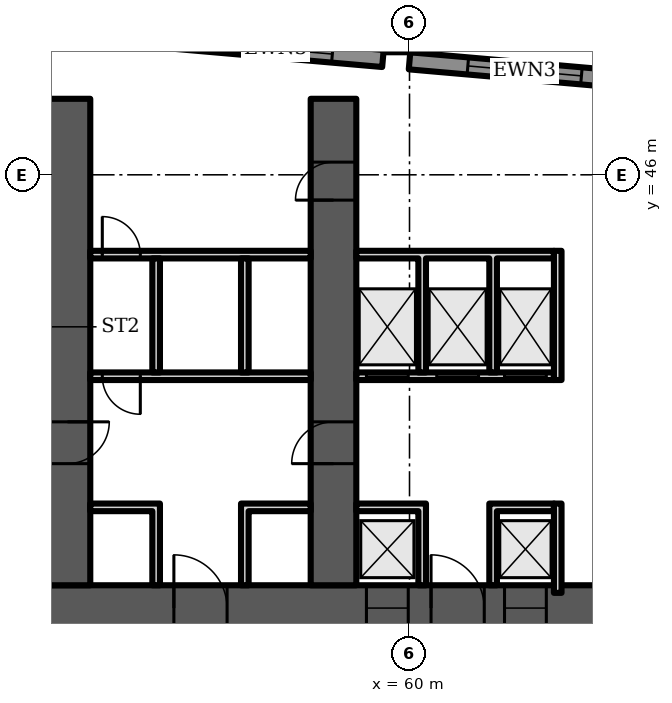
"""IFC4 building model, lengths in metres.
Left out: names, types, materials, properties, quantities, classifications, styles, units other than length and angle.
Written with IfcOpenShell. Run it as: python <this file> out.ifc"""

import sys

from ifc_helpers import new_model, si_unit, direction, frame, frame_2d, origin, origin_2d, place, context, subcontext, project, spatial, polyline, rectangle, outline, extrude, element, fill, save


model = new_model("IFC4")
c1 = context("Model", 3, precision=1e-05, world=origin(), true_north=direction((0.0, 1.0)))
c2 = subcontext(c1, "Body", "Model", "MODEL_VIEW")
j1 = project(units=[si_unit("LENGTHUNIT", "METRE"), si_unit("PLANEANGLEUNIT", "RADIAN")], contexts=[c1])
p1 = place(None, origin())
s1 = spatial("IfcSite", under=j1, at=p1, CompositionType="ELEMENT")
p2 = place(p1, origin())
s2 = spatial("IfcBuilding", under=s1, at=p2, CompositionType="ELEMENT")
p3 = place(p2, frame((0.0, 0.0, 21.5)))
s3 = spatial("IfcBuildingStorey", under=s2, at=p3, CompositionType="ELEMENT", Elevation=21.5)
p4 = place(p3, frame((60.0, 49.885, 0.0), z_axis=(0.0, 0.0, 1.0), x_axis=(1.0, 0.0, 0.0)))
e1 = element("IfcColumn", 1, at=p4, inside=s3, PredefinedType="COLUMN", context=c2, shape_type="SweptSolid", body=[
    extrude(rectangle(XDim=1.32, YDim=1.32, at=origin_2d()), origin(), (0.0, 0.0, 1.0), 6.0),
])
p5 = place(p3, frame((66.058, 48.469, 0.0), z_axis=(0.0, 0.0, 1.0), x_axis=(-0.996195, 0.087158, 0.0)))
e2 = element("IfcWall", 2, at=p5, inside=s3, PredefinedType="SOLIDWALL", context=c2, shape_type="SweptSolid", body=[
    extrude(rectangle(XDim=6.081, YDim=0.45, at=frame_2d((3.041, 0.0))), origin(), (0.0, 0.0, 1.0), 5.7),
])
p6 = place(p5, frame((1.541, 0.0, 1.0)))
e3 = element("IfcOpeningElement", 3, at=p6, cuts=e2, PredefinedType="OPENING", context=c2, shape_type="SweptSolid", body=[
    extrude(rectangle(XDim=3.0, YDim=3.7, at=frame_2d((1.5, 1.85))), frame((0.0, 0.235, 0.0), z_axis=(0.0, -1.0, 0.0), x_axis=(1.0, 0.0, 0.0)), (0.0, 0.0, 1.0), 0.47),
])
p7 = place(p3, frame((59.301, 49.06, 0.0), z_axis=(0.0, 0.0, 1.0), x_axis=(-0.996195, 0.087145, 0.0)))
e4 = element("IfcWall", 4, at=p7, inside=s3, PredefinedType="SOLIDWALL", context=c2, shape_type="SweptSolid", body=[
    extrude(rectangle(XDim=11.344, YDim=0.45, at=frame_2d((5.672, 0.0))), origin(), (0.0, 0.0, 1.0), 5.7),
])
p8 = place(p7, frame((1.336, 0.0, 1.0)))
e5 = element("IfcOpeningElement", 5, at=p8, cuts=e4, PredefinedType="OPENING", context=c2, shape_type="SweptSolid", body=[
    extrude(rectangle(XDim=3.0, YDim=3.7, at=frame_2d((1.5, 1.85))), frame((0.0, 0.235, 0.0), z_axis=(0.0, -1.0, 0.0), x_axis=(1.0, 0.0, 0.0)), (0.0, 0.0, 1.0), 0.47),
])
p9 = place(p7, frame((7.008, 0.0, 1.0)))
e6 = element("IfcOpeningElement", 6, at=p9, cuts=e4, PredefinedType="OPENING", context=c2, shape_type="SweptSolid", body=[
    extrude(rectangle(XDim=3.0, YDim=3.7, at=frame_2d((1.5, 1.85))), frame((0.0, 0.235, 0.0), z_axis=(0.0, -1.0, 0.0), x_axis=(1.0, 0.0, 0.0)), (0.0, 0.0, 1.0), 0.47),
])
p10 = place(p3, frame((9.0, 34.6, 0.0), z_axis=(0.0, 0.0, 1.0), x_axis=(1.0, 0.0, 0.0)))
e7 = element("IfcWall", 7, at=p10, inside=s3, PredefinedType="SHEAR", context=c2, shape_type="SweptSolid", body=[
    extrude(rectangle(XDim=56.0, YDim=1.2, at=frame_2d((28.0, 0.0))), origin(), (0.0, 0.0, 1.0), 5.7),
])
p11 = place(p10, frame((2.0, 0.0, 0.0)))
e8 = element("IfcOpeningElement", 8, at=p11, cuts=e7, PredefinedType="OPENING", context=c2, shape_type="SweptSolid", body=[
    extrude(rectangle(XDim=1.0, YDim=2.1, at=frame_2d((0.5, 1.05))), frame((0.0, 0.61, 0.0), z_axis=(0.0, -1.0, 0.0), x_axis=(1.0, 0.0, 0.0)), (0.0, 0.0, 1.0), 1.22),
])
p12 = place(p10, frame((4.6, 0.0, 0.0)))
e9 = element("IfcOpeningElement", 9, at=p12, cuts=e7, PredefinedType="OPENING", context=c2, shape_type="SweptSolid", body=[
    extrude(rectangle(XDim=1.0, YDim=2.1, at=frame_2d((0.5, 1.05))), frame((0.0, 0.61, 0.0), z_axis=(0.0, -1.0, 0.0), x_axis=(1.0, 0.0, 0.0)), (0.0, 0.0, 1.0), 1.22),
])
p13 = place(p10, frame((7.867, 0.0, 0.0)))
e10 = element("IfcOpeningElement", 10, at=p13, cuts=e7, PredefinedType="OPENING", context=c2, shape_type="SweptSolid", body=[
    extrude(rectangle(XDim=1.1, YDim=2.1, at=frame_2d((0.55, 1.05))), frame((0.0, 0.61, 0.0), z_axis=(0.0, -1.0, 0.0), x_axis=(1.0, 0.0, 0.0)), (0.0, 0.0, 1.0), 1.22),
])
p14 = place(p10, frame((12.033, 0.0, 0.0)))
e11 = element("IfcOpeningElement", 11, at=p14, cuts=e7, PredefinedType="OPENING", context=c2, shape_type="SweptSolid", body=[
    extrude(rectangle(XDim=1.1, YDim=2.1, at=frame_2d((0.55, 1.05))), frame((0.0, 0.61, 0.0), z_axis=(0.0, -1.0, 0.0), x_axis=(1.0, 0.0, 0.0)), (0.0, 0.0, 1.0), 1.22),
])
p15 = place(p10, frame((9.8, 0.0, 0.0)))
e12 = element("IfcOpeningElement", 12, at=p15, cuts=e7, PredefinedType="OPENING", context=c2, shape_type="SweptSolid", body=[
    extrude(rectangle(XDim=1.4, YDim=2.1, at=frame_2d((0.7, 1.05))), frame((0.0, 0.61, 0.0), z_axis=(0.0, -1.0, 0.0), x_axis=(1.0, 0.0, 0.0)), (0.0, 0.0, 1.0), 1.22),
])
p16 = place(p10, frame((14.65, 0.0, 0.0)))
e13 = element("IfcOpeningElement", 13, at=p16, cuts=e7, PredefinedType="OPENING", context=c2, shape_type="SweptSolid", body=[
    extrude(rectangle(XDim=1.2, YDim=2.1, at=frame_2d((0.6, 1.05))), frame((0.0, 0.61, 0.0), z_axis=(0.0, -1.0, 0.0), x_axis=(1.0, 0.0, 0.0)), (0.0, 0.0, 1.0), 1.22),
])
p17 = place(p10, frame((21.867, 0.0, 0.0)))
e14 = element("IfcOpeningElement", 14, at=p17, cuts=e7, PredefinedType="OPENING", context=c2, shape_type="SweptSolid", body=[
    extrude(rectangle(XDim=1.1, YDim=2.1, at=frame_2d((0.55, 1.05))), frame((0.0, 0.61, 0.0), z_axis=(0.0, -1.0, 0.0), x_axis=(1.0, 0.0, 0.0)), (0.0, 0.0, 1.0), 1.22),
])
p18 = place(p10, frame((26.033, 0.0, 0.0)))
e15 = element("IfcOpeningElement", 15, at=p18, cuts=e7, PredefinedType="OPENING", context=c2, shape_type="SweptSolid", body=[
    extrude(rectangle(XDim=1.1, YDim=2.1, at=frame_2d((0.55, 1.05))), frame((0.0, 0.61, 0.0), z_axis=(0.0, -1.0, 0.0), x_axis=(1.0, 0.0, 0.0)), (0.0, 0.0, 1.0), 1.22),
])
p19 = place(p10, frame((23.8, 0.0, 0.0)))
e16 = element("IfcOpeningElement", 16, at=p19, cuts=e7, PredefinedType="OPENING", context=c2, shape_type="SweptSolid", body=[
    extrude(rectangle(XDim=1.4, YDim=2.1, at=frame_2d((0.7, 1.05))), frame((0.0, 0.61, 0.0), z_axis=(0.0, -1.0, 0.0), x_axis=(1.0, 0.0, 0.0)), (0.0, 0.0, 1.0), 1.22),
])
p20 = place(p10, frame((28.867, 0.0, 0.0)))
e17 = element("IfcOpeningElement", 17, at=p20, cuts=e7, PredefinedType="OPENING", context=c2, shape_type="SweptSolid", body=[
    extrude(rectangle(XDim=1.1, YDim=2.1, at=frame_2d((0.55, 1.05))), frame((0.0, 0.61, 0.0), z_axis=(0.0, -1.0, 0.0), x_axis=(1.0, 0.0, 0.0)), (0.0, 0.0, 1.0), 1.22),
])
p21 = place(p10, frame((33.033, 0.0, 0.0)))
e18 = element("IfcOpeningElement", 18, at=p21, cuts=e7, PredefinedType="OPENING", context=c2, shape_type="SweptSolid", body=[
    extrude(rectangle(XDim=1.1, YDim=2.1, at=frame_2d((0.55, 1.05))), frame((0.0, 0.61, 0.0), z_axis=(0.0, -1.0, 0.0), x_axis=(1.0, 0.0, 0.0)), (0.0, 0.0, 1.0), 1.22),
])
p22 = place(p10, frame((40.15, 0.0, 0.0)))
e19 = element("IfcOpeningElement", 19, at=p22, cuts=e7, PredefinedType="OPENING", context=c2, shape_type="SweptSolid", body=[
    extrude(rectangle(XDim=1.2, YDim=2.1, at=frame_2d((0.6, 1.05))), frame((0.0, 0.61, 0.0), z_axis=(0.0, -1.0, 0.0), x_axis=(1.0, 0.0, 0.0)), (0.0, 0.0, 1.0), 1.22),
])
p23 = place(p10, frame((44.8, 0.0, 0.0)))
e20 = element("IfcOpeningElement", 20, at=p23, cuts=e7, PredefinedType="OPENING", context=c2, shape_type="SweptSolid", body=[
    extrude(rectangle(XDim=1.4, YDim=2.1, at=frame_2d((0.7, 1.05))), frame((0.0, 0.61, 0.0), z_axis=(0.0, -1.0, 0.0), x_axis=(1.0, 0.0, 0.0)), (0.0, 0.0, 1.0), 1.22),
])
p24 = place(p10, frame((49.867, 0.0, 0.0)))
e21 = element("IfcOpeningElement", 21, at=p24, cuts=e7, PredefinedType="OPENING", context=c2, shape_type="SweptSolid", body=[
    extrude(rectangle(XDim=1.1, YDim=2.1, at=frame_2d((0.55, 1.05))), frame((0.0, 0.61, 0.0), z_axis=(0.0, -1.0, 0.0), x_axis=(1.0, 0.0, 0.0)), (0.0, 0.0, 1.0), 1.22),
])
p25 = place(p10, frame((53.5, 0.0, 0.0)))
e22 = element("IfcOpeningElement", 22, at=p25, cuts=e7, PredefinedType="OPENING", context=c2, shape_type="SweptSolid", body=[
    extrude(rectangle(XDim=1.1, YDim=2.1, at=frame_2d((0.55, 1.05))), frame((0.0, 0.61, 0.0), z_axis=(0.0, -1.0, 0.0), x_axis=(1.0, 0.0, 0.0)), (0.0, 0.0, 1.0), 1.22),
])
p26 = place(p10, frame((51.567, 0.0, 0.0)))
e23 = element("IfcOpeningElement", 23, at=p26, cuts=e7, PredefinedType="OPENING", context=c2, shape_type="SweptSolid", body=[
    extrude(rectangle(XDim=1.4, YDim=2.1, at=frame_2d((0.7, 1.05))), frame((0.0, 0.61, 0.0), z_axis=(0.0, -1.0, 0.0), x_axis=(1.0, 0.0, 0.0)), (0.0, 0.0, 1.0), 1.22),
])
p27 = place(p3, frame((51.0, 35.2, 0.0), z_axis=(0.0, 0.0, 1.0), x_axis=(0.0, 1.0, 0.0)))
e24 = element("IfcWall", 24, at=p27, inside=s3, PredefinedType="SHEAR", context=c2, shape_type="SweptSolid", body=[
    extrude(rectangle(XDim=12.8, YDim=1.2, at=frame_2d((6.4, 0.0))), origin(), (0.0, 0.0, 1.0), 5.7),
])
p28 = place(p27, frame((3.2, 0.0, 0.0)))
e25 = element("IfcOpeningElement", 25, at=p28, cuts=e24, PredefinedType="OPENING", context=c2, shape_type="SweptSolid", body=[
    extrude(rectangle(XDim=1.1, YDim=2.1, at=frame_2d((0.55, 1.05))), frame((0.0, 0.61, 0.0), z_axis=(0.0, -1.0, 0.0), x_axis=(1.0, 0.0, 0.0)), (0.0, 0.0, 1.0), 1.22),
])
p29 = place(p3, frame((58.0, 35.2, 0.0), z_axis=(0.0, 0.0, 1.0), x_axis=(0.0, 1.0, 0.0)))
e26 = element("IfcWall", 26, at=p29, inside=s3, PredefinedType="SHEAR", context=c2, shape_type="SweptSolid", body=[
    extrude(rectangle(XDim=12.8, YDim=1.2, at=frame_2d((6.4, 0.0))), origin(), (0.0, 0.0, 1.0), 5.7),
])
p30 = place(p29, frame((10.134, 0.0, 0.0)))
e27 = element("IfcOpeningElement", 27, at=p30, cuts=e26, PredefinedType="OPENING", context=c2, shape_type="SweptSolid", body=[
    extrude(rectangle(XDim=1.0, YDim=2.1, at=frame_2d((0.5, 1.05))), frame((0.0, 0.61, 0.0), z_axis=(0.0, -1.0, 0.0), x_axis=(1.0, 0.0, 0.0)), (0.0, 0.0, 1.0), 1.22),
])
p31 = place(p29, frame((3.2, 0.0, 0.0)))
e28 = element("IfcOpeningElement", 28, at=p31, cuts=e26, PredefinedType="OPENING", context=c2, shape_type="SweptSolid", body=[
    extrude(rectangle(XDim=1.1, YDim=2.1, at=frame_2d((0.55, 1.05))), frame((0.0, 0.61, 0.0), z_axis=(0.0, -1.0, 0.0), x_axis=(1.0, 0.0, 0.0)), (0.0, 0.0, 1.0), 1.22),
])
p32 = place(p3, frame((51.6, 40.7, 0.0), z_axis=(0.0, 0.0, 1.0), x_axis=(1.0, 0.0, 0.0)))
e29 = element("IfcWall", 29, at=p32, inside=s3, PredefinedType="PARTITIONING", context=c2, shape_type="SweptSolid", body=[
    extrude(rectangle(XDim=5.8, YDim=0.2, at=frame_2d((2.9, 0.0))), origin(), (0.0, 0.0, 1.0), 5.7),
])
p33 = place(p32, frame((0.317, 0.0, 0.0)))
e30 = element("IfcOpeningElement", 30, at=p33, cuts=e29, PredefinedType="OPENING", context=c2, shape_type="SweptSolid", body=[
    extrude(rectangle(XDim=1.0, YDim=2.1, at=frame_2d((0.5, 1.05))), frame((0.0, 0.11, 0.0), z_axis=(0.0, -1.0, 0.0), x_axis=(1.0, 0.0, 0.0)), (0.0, 0.0, 1.0), 0.22),
])
p34 = place(p3, frame((51.6, 43.9, 0.0), z_axis=(0.0, 0.0, 1.0), x_axis=(1.0, 0.0, 0.0)))
e31 = element("IfcWall", 31, at=p34, inside=s3, PredefinedType="PARTITIONING", context=c2, shape_type="SweptSolid", body=[
    extrude(rectangle(XDim=5.8, YDim=0.2, at=frame_2d((2.9, 0.0))), origin(), (0.0, 0.0, 1.0), 5.7),
])
p35 = place(p34, frame((0.317, 0.0, 0.0)))
e32 = element("IfcOpeningElement", 32, at=p35, cuts=e31, PredefinedType="OPENING", context=c2, shape_type="SweptSolid", body=[
    extrude(rectangle(XDim=1.0, YDim=2.1, at=frame_2d((0.5, 1.05))), frame((0.0, 0.11, 0.0), z_axis=(0.0, -1.0, 0.0), x_axis=(1.0, 0.0, 0.0)), (0.0, 0.0, 1.0), 0.22),
])
p36 = place(p3, frame((0.0, 0.0, -0.0)))
e33 = element("IfcWall", 33, at=p36, inside=s3, PredefinedType="PARTITIONING", context=c2, shape_type="SweptSolid", body=[
    extrude(outline(polyline([(53.233, 37.15), (51.6, 37.15), (51.6, 37.35), (53.233, 37.35), (53.433, 37.35), (53.433, 35.2), (53.233, 35.2), (53.233, 37.15)])), origin(), (0.0, 0.0, 1.0), 5.7),
])
p37 = place(p3, frame((0.0, 0.0, -0.0)))
e34 = element("IfcWall", 34, at=p37, inside=s3, PredefinedType="PARTITIONING", context=c2, shape_type="SweptSolid", body=[
    extrude(outline(polyline([(55.567, 37.35), (55.767, 37.35), (57.4, 37.35), (57.4, 37.15), (55.767, 37.15), (55.767, 35.2), (55.567, 35.2), (55.567, 37.35)])), origin(), (0.0, 0.0, 1.0), 5.7),
])
p38 = place(p3, frame((0.0, 0.0, -0.0)))
e35 = element("IfcWall", 35, at=p38, inside=s3, PredefinedType="PARTITIONING", context=c2, shape_type="SweptSolid", body=[
    extrude(outline(polyline([(53.233, 40.8), (53.233, 43.8), (53.433, 43.8), (53.433, 40.8), (53.233, 40.8)])), origin(), (0.0, 0.0, 1.0), 5.7),
])
p39 = place(p3, frame((0.0, 0.0, -0.0)))
e36 = element("IfcWall", 36, at=p39, inside=s3, PredefinedType="PARTITIONING", context=c2, shape_type="SweptSolid", body=[
    extrude(outline(polyline([(55.567, 40.8), (55.567, 43.8), (55.767, 43.8), (55.767, 40.8), (55.567, 40.8)])), origin(), (0.0, 0.0, 1.0), 5.7),
])
p40 = place(p3, frame((58.6, 40.7, 0.0), z_axis=(0.0, 0.0, 1.0), x_axis=(1.0, 0.0, 0.0)))
e37 = element("IfcWall", 37, at=p40, inside=s3, PredefinedType="PARTITIONING", context=c2, shape_type="SweptSolid", body=[
    extrude(rectangle(XDim=5.2, YDim=0.2, at=frame_2d((2.6, 0.0))), origin(), (0.0, 0.0, 1.0), 5.7),
])
p41 = place(p40, frame((0.267, 0.0, 0.0)))
e38 = element("IfcOpeningElement", 38, at=p41, cuts=e37, PredefinedType="OPENING", context=c2, shape_type="SweptSolid", body=[
    extrude(rectangle(XDim=1.1, YDim=2.1, at=frame_2d((0.55, 1.05))), frame((0.0, 0.11, 0.0), z_axis=(0.0, -1.0, 0.0), x_axis=(1.0, 0.0, 0.0)), (0.0, 0.0, 1.0), 0.22),
])
p42 = place(p40, frame((2.117, 0.0, 0.0)))
e39 = element("IfcOpeningElement", 39, at=p42, cuts=e37, PredefinedType="OPENING", context=c2, shape_type="SweptSolid", body=[
    extrude(rectangle(XDim=1.1, YDim=2.1, at=frame_2d((0.55, 1.05))), frame((0.0, 0.11, 0.0), z_axis=(0.0, -1.0, 0.0), x_axis=(1.0, 0.0, 0.0)), (0.0, 0.0, 1.0), 0.22),
])
p43 = place(p40, frame((3.9, 0.0, 0.0)))
e40 = element("IfcOpeningElement", 40, at=p43, cuts=e37, PredefinedType="OPENING", context=c2, shape_type="SweptSolid", body=[
    extrude(rectangle(XDim=1.1, YDim=2.1, at=frame_2d((0.55, 1.05))), frame((0.0, 0.11, 0.0), z_axis=(0.0, -1.0, 0.0), x_axis=(1.0, 0.0, 0.0)), (0.0, 0.0, 1.0), 0.22),
])
p44 = place(p3, frame((0.0, 0.0, -0.0)))
e41 = element("IfcWall", 41, at=p44, inside=s3, PredefinedType="PARTITIONING", context=c2, shape_type="SweptSolid", body=[
    extrude(outline(polyline([(60.233, 37.15), (58.6, 37.15), (58.6, 37.35), (60.233, 37.35), (60.433, 37.35), (60.433, 35.2), (60.233, 35.2), (60.233, 37.15)])), origin(), (0.0, 0.0, 1.0), 5.7),
])
p45 = place(p3, frame((0.0, 0.0, -0.0)))
e42 = element("IfcWall", 42, at=p45, inside=s3, PredefinedType="PARTITIONING", context=c2, shape_type="SweptSolid", body=[
    extrude(outline(polyline([(62.1, 37.35), (62.3, 37.35), (63.8, 37.35), (63.8, 37.15), (62.3, 37.15), (62.3, 35.2), (62.1, 35.2), (62.1, 37.35)])), origin(), (0.0, 0.0, 1.0), 5.7),
])
p46 = place(p3, frame((0.0, 0.0, -0.0)))
e43 = element("IfcWall", 43, at=p46, inside=s3, PredefinedType="PARTITIONING", context=c2, shape_type="SweptSolid", body=[
    extrude(outline(polyline([(60.433, 40.8), (60.233, 40.8), (60.233, 43.8), (58.6, 43.8), (58.6, 44.0), (63.8, 44.0), (63.8, 43.8), (62.3, 43.8), (62.3, 40.8), (62.1, 40.8), (62.1, 43.8), (60.433, 43.8), (60.433, 40.8)])), origin(), (0.0, 0.0, 1.0), 5.7),
])
p47 = place(p3, frame((63.9, 35.0, 0.0), z_axis=(0.0, 0.0, 1.0), x_axis=(0.0, 1.0, 0.0)))
e44 = element("IfcWall", 44, at=p47, inside=s3, PredefinedType="PARTITIONING", context=c2, shape_type="SweptSolid", body=[
    extrude(rectangle(XDim=2.35, YDim=0.2, at=frame_2d((1.175, 0.0))), origin(), (0.0, 0.0, 1.0), 5.7),
])
p48 = place(p3, frame((63.9, 40.6, 0.0), z_axis=(0.0, 0.0, 1.0), x_axis=(0.0, 1.0, 0.0)))
e45 = element("IfcWall", 45, at=p48, inside=s3, PredefinedType="PARTITIONING", context=c2, shape_type="SweptSolid", body=[
    extrude(rectangle(XDim=3.4, YDim=0.2, at=frame_2d((1.7, 0.0))), origin(), (0.0, 0.0, 1.0), 5.7),
])
p49 = place(p6, origin())
e46 = element("IfcWindow", 46, at=p49, inside=s3, PartitioningType="SINGLE_PANEL", PredefinedType="WINDOW", context=c2, shape_type="SweptSolid", body=[
    extrude(rectangle(XDim=3.0, YDim=3.7, at=frame_2d((1.5, 1.85))), frame((0.0, 0.105, 0.0), z_axis=(0.0, -1.0, 0.0), x_axis=(1.0, 0.0, 0.0)), (0.0, 0.0, 1.0), 0.06),
])
fill(e3, e46)
p50 = place(p8, origin())
e47 = element("IfcWindow", 47, at=p50, inside=s3, PartitioningType="SINGLE_PANEL", PredefinedType="WINDOW", context=c2, shape_type="SweptSolid", body=[
    extrude(rectangle(XDim=3.0, YDim=3.7, at=frame_2d((1.5, 1.85))), frame((0.0, 0.105, 0.0), z_axis=(0.0, -1.0, 0.0), x_axis=(1.0, 0.0, 0.0)), (0.0, 0.0, 1.0), 0.06),
])
fill(e5, e47)
p51 = place(p23, origin())
e48 = element("IfcDoor", 48, at=p51, inside=s3, OperationType="DOUBLE_DOOR_SINGLE_SWING", PredefinedType="DOOR", context=c2, shape_type="SweptSolid", body=[
    extrude(rectangle(XDim=1.4, YDim=2.1, at=frame_2d((0.7, 1.05))), frame((0.0, 0.025, 0.0), z_axis=(0.0, -1.0, 0.0), x_axis=(1.0, 0.0, 0.0)), (0.0, 0.0, 1.0), 0.05),
])
fill(e20, e48)
p52 = place(p33, origin())
e49 = element("IfcDoor", 49, at=p52, inside=s3, OperationType="SINGLE_SWING_RIGHT", PredefinedType="DOOR", context=c2, shape_type="SweptSolid", body=[
    extrude(rectangle(XDim=1.0, YDim=2.1, at=frame_2d((0.5, 1.05))), frame((0.0, 0.025, 0.0), z_axis=(0.0, -1.0, 0.0), x_axis=(1.0, 0.0, 0.0)), (0.0, 0.0, 1.0), 0.05),
])
fill(e30, e49)
p53 = place(p35, origin())
e50 = element("IfcDoor", 50, at=p53, inside=s3, OperationType="SINGLE_SWING_LEFT", PredefinedType="DOOR", context=c2, shape_type="SweptSolid", body=[
    extrude(rectangle(XDim=1.0, YDim=2.1, at=frame_2d((0.5, 1.05))), frame((0.0, 0.025, 0.0), z_axis=(0.0, -1.0, 0.0), x_axis=(1.0, 0.0, 0.0)), (0.0, 0.0, 1.0), 0.05),
])
fill(e32, e50)
p54 = place(p24, origin())
e51 = element("IfcDoor", 51, at=p54, inside=s3, OperationType="DOUBLE_DOOR_SLIDING", PredefinedType="DOOR", context=c2, shape_type="SweptSolid", body=[
    extrude(rectangle(XDim=1.1, YDim=2.1, at=frame_2d((0.55, 1.05))), frame((0.0, 0.025, 0.0), z_axis=(0.0, -1.0, 0.0), x_axis=(1.0, 0.0, 0.0)), (0.0, 0.0, 1.0), 0.05),
])
fill(e21, e51)
p55 = place(p25, origin())
e52 = element("IfcDoor", 52, at=p55, inside=s3, OperationType="DOUBLE_DOOR_SLIDING", PredefinedType="DOOR", context=c2, shape_type="SweptSolid", body=[
    extrude(rectangle(XDim=1.1, YDim=2.1, at=frame_2d((0.55, 1.05))), frame((0.0, 0.025, 0.0), z_axis=(0.0, -1.0, 0.0), x_axis=(1.0, 0.0, 0.0)), (0.0, 0.0, 1.0), 0.05),
])
fill(e22, e52)
p56 = place(p26, origin())
e53 = element("IfcDoor", 53, at=p56, inside=s3, OperationType="DOUBLE_DOOR_SINGLE_SWING", PredefinedType="DOOR", context=c2, shape_type="SweptSolid", body=[
    extrude(rectangle(XDim=1.4, YDim=2.1, at=frame_2d((0.7, 1.05))), frame((0.0, 0.025, 0.0), z_axis=(0.0, -1.0, 0.0), x_axis=(1.0, 0.0, 0.0)), (0.0, 0.0, 1.0), 0.05),
])
fill(e23, e53)
p57 = place(p41, origin())
e54 = element("IfcDoor", 54, at=p57, inside=s3, OperationType="DOUBLE_DOOR_SLIDING", PredefinedType="DOOR", context=c2, shape_type="SweptSolid", body=[
    extrude(rectangle(XDim=1.1, YDim=2.1, at=frame_2d((0.55, 1.05))), frame((0.0, 0.025, 0.0), z_axis=(0.0, -1.0, 0.0), x_axis=(1.0, 0.0, 0.0)), (0.0, 0.0, 1.0), 0.05),
])
fill(e38, e54)
p58 = place(p42, origin())
e55 = element("IfcDoor", 55, at=p58, inside=s3, OperationType="DOUBLE_DOOR_SLIDING", PredefinedType="DOOR", context=c2, shape_type="SweptSolid", body=[
    extrude(rectangle(XDim=1.1, YDim=2.1, at=frame_2d((0.55, 1.05))), frame((0.0, 0.025, 0.0), z_axis=(0.0, -1.0, 0.0), x_axis=(1.0, 0.0, 0.0)), (0.0, 0.0, 1.0), 0.05),
])
fill(e39, e55)
p59 = place(p43, origin())
e56 = element("IfcDoor", 56, at=p59, inside=s3, OperationType="DOUBLE_DOOR_SLIDING", PredefinedType="DOOR", context=c2, shape_type="SweptSolid", body=[
    extrude(rectangle(XDim=1.1, YDim=2.1, at=frame_2d((0.55, 1.05))), frame((0.0, 0.025, 0.0), z_axis=(0.0, -1.0, 0.0), x_axis=(1.0, 0.0, 0.0)), (0.0, 0.0, 1.0), 0.05),
])
fill(e40, e56)
p60 = place(p30, origin())
e57 = element("IfcDoor", 57, at=p60, inside=s3, OperationType="SINGLE_SWING_LEFT", PredefinedType="DOOR", context=c2, shape_type="SweptSolid", body=[
    extrude(rectangle(XDim=1.0, YDim=2.1, at=frame_2d((0.5, 1.05))), frame((0.0, 0.6, 0.0), z_axis=(0.0, -1.0, 0.0), x_axis=(1.0, 0.0, 0.0)), (0.0, 0.0, 1.0), 1.199),
])
fill(e27, e57)
p61 = place(p28, origin())
e58 = element("IfcDoor", 58, at=p61, inside=s3, OperationType="SINGLE_SWING_RIGHT", PredefinedType="DOOR", context=c2, shape_type="SweptSolid", body=[
    extrude(rectangle(XDim=1.1, YDim=2.1, at=frame_2d((0.55, 1.05))), frame((0.0, 0.025, 0.0), z_axis=(0.0, -1.0, 0.0), x_axis=(1.0, 0.0, 0.0)), (0.0, 0.0, 1.0), 0.05),
])
fill(e25, e58)
p62 = place(p31, origin())
e59 = element("IfcDoor", 59, at=p62, inside=s3, OperationType="SINGLE_SWING_LEFT", PredefinedType="DOOR", context=c2, shape_type="SweptSolid", body=[
    extrude(rectangle(XDim=1.1, YDim=2.1, at=frame_2d((0.55, 1.05))), frame((0.0, 0.025, 0.0), z_axis=(0.0, -1.0, 0.0), x_axis=(1.0, 0.0, 0.0)), (0.0, 0.0, 1.0), 0.05),
])
fill(e28, e59)
save(model, sys.argv[1])
